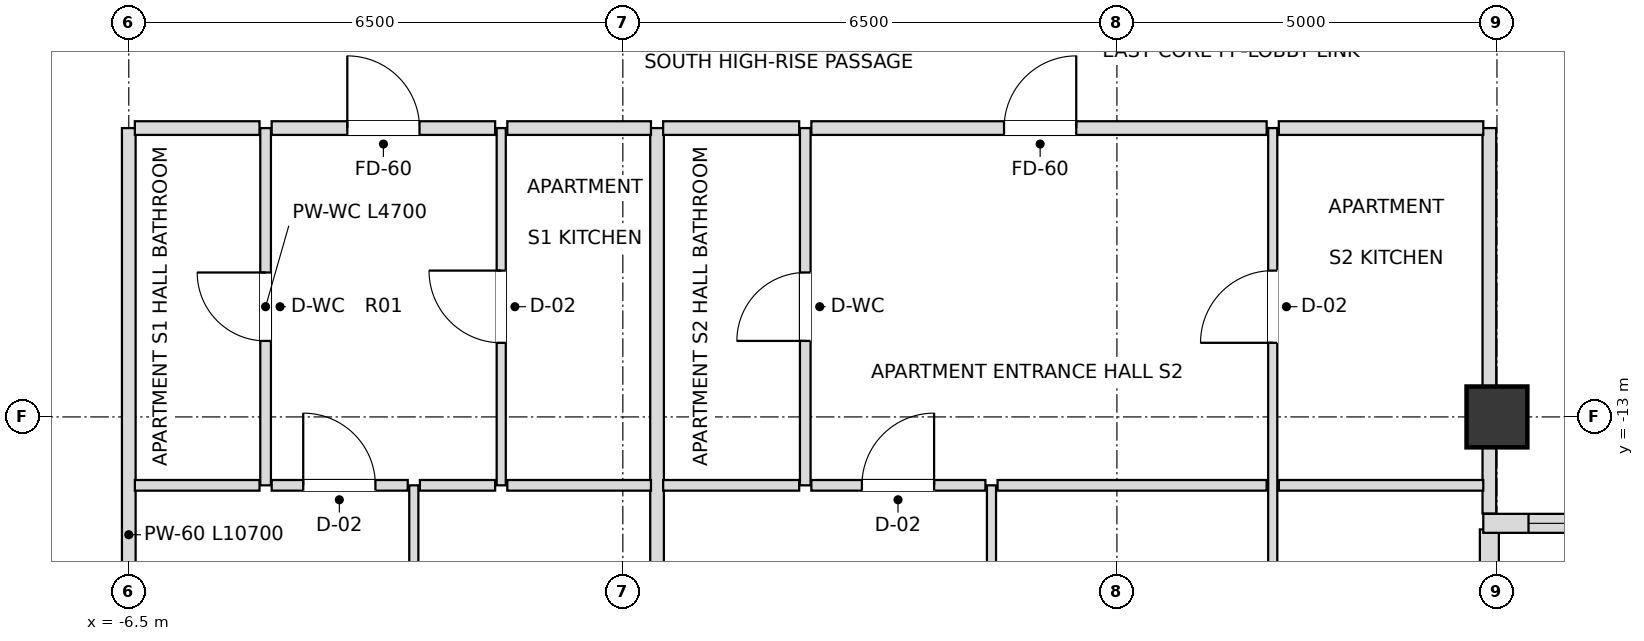
"""IFC4 building model, lengths in metres.
Left out: names, types, materials, properties, quantities, classifications, styles, units other than length and angle.
Written with IfcOpenShell. Run it as: python <this file> out.ifc"""

import sys

from ifc_helpers import new_model, si_unit, direction, frame, frame_2d, origin, origin_2d, place, context, subcontext, project, spatial, rectangle, extrude, element, fill, save


model = new_model("IFC4")
c1 = context("Model", 3, precision=1e-05, world=origin(), true_north=direction((0.0, 1.0)))
c2 = subcontext(c1, "Body", "Model", "MODEL_VIEW")
j1 = project(units=[si_unit("LENGTHUNIT", "METRE"), si_unit("PLANEANGLEUNIT", "RADIAN")], contexts=[c1])
p1 = place(None, origin())
s1 = spatial("IfcSite", under=j1, at=p1, CompositionType="ELEMENT")
p2 = place(p1, origin())
s2 = spatial("IfcBuilding", under=s1, at=p2, CompositionType="ELEMENT")
p3 = place(p2, frame((0.0, 0.0, 225.9)))
s3 = spatial("IfcBuildingStorey", under=s2, at=p3, CompositionType="ELEMENT", Elevation=225.9)
p4 = place(p3, frame((11.5, -13.0, 0.0), z_axis=(0.0, 0.0, 1.0), x_axis=(1.0, 0.0, 0.0)))
e1 = element("IfcColumn", 1, at=p4, inside=s3, PredefinedType="COLUMN", context=c2, shape_type="SweptSolid", body=[
    extrude(rectangle(XDim=0.8, YDim=0.8, at=origin_2d()), origin(), (0.0, 0.0, 1.0), 3.6),
])
p5 = place(p3, frame((11.4, -19.82, 0.0), z_axis=(0.0, 0.0, 1.0), x_axis=(0.0, 1.0, 0.0)))
e2 = element("IfcWall", 2, at=p5, inside=s3, PredefinedType="SOLIDWALL", context=c2, shape_type="SweptSolid", body=[
    extrude(rectangle(XDim=5.34, YDim=0.25, at=frame_2d((2.67, 0.0))), origin(), (0.0, 0.0, 1.0), 2.748),
])
p6 = place(p5, frame((1.925, 0.0, 0.72)))
e3 = element("IfcOpeningElement", 3, at=p6, cuts=e2, PredefinedType="OPENING", context=c2, shape_type="SweptSolid", body=[
    extrude(rectangle(XDim=1.8, YDim=1.68, at=frame_2d((0.9, 0.84))), frame((0.0, 0.135, 0.0), z_axis=(0.0, -1.0, 0.0), x_axis=(1.0, 0.0, 0.0)), (0.0, 0.0, 1.0), 0.27),
])
p7 = place(p3, frame((11.32, -14.4, 0.0), z_axis=(0.0, 0.0, 1.0), x_axis=(1.0, 0.0, 0.0)))
e4 = element("IfcWall", 4, at=p7, inside=s3, PredefinedType="SOLIDWALL", context=c2, shape_type="SweptSolid", body=[
    extrude(rectangle(XDim=5.66, YDim=0.25, at=frame_2d((2.83, 0.0))), origin(), (0.0, 0.0, 1.0), 2.748),
])
p8 = place(p7, frame((0.595, 0.0, 0.72)))
e5 = element("IfcOpeningElement", 5, at=p8, cuts=e4, PredefinedType="OPENING", context=c2, shape_type="SweptSolid", body=[
    extrude(rectangle(XDim=1.8, YDim=1.68, at=frame_2d((0.9, 0.84))), frame((0.0, 0.135, 0.0), z_axis=(0.0, -1.0, 0.0), x_axis=(1.0, 0.0, 0.0)), (0.0, 0.0, 1.0), 0.27),
])
p9 = place(p7, frame((3.265, 0.0, 0.72)))
e6 = element("IfcOpeningElement", 6, at=p9, cuts=e4, PredefinedType="OPENING", context=c2, shape_type="SweptSolid", body=[
    extrude(rectangle(XDim=1.8, YDim=1.68, at=frame_2d((0.9, 0.84))), frame((0.0, 0.135, 0.0), z_axis=(0.0, -1.0, 0.0), x_axis=(1.0, 0.0, 0.0)), (0.0, 0.0, 1.0), 0.27),
])
p10 = place(p3, frame((-6.5, -19.9, 0.0), z_axis=(0.0, 0.0, 1.0), x_axis=(0.0, 1.0, 0.0)))
e7 = element("IfcWall", 7, at=p10, inside=s3, PredefinedType="PARTITIONING", context=c2, shape_type="SweptSolid", body=[
    extrude(rectangle(XDim=10.7, YDim=0.18, at=frame_2d((5.35, 0.0))), origin(), (0.0, 0.0, 1.0), 2.826),
])
p11 = place(p3, frame((-4.7, -13.9, 0.0), z_axis=(0.0, 0.0, 1.0), x_axis=(0.0, 1.0, 0.0)))
e8 = element("IfcWall", 8, at=p11, inside=s3, PredefinedType="PARTITIONING", context=c2, shape_type="SweptSolid", body=[
    extrude(rectangle(XDim=4.7, YDim=0.14, at=frame_2d((2.35, 0.0))), origin(), (0.0, 0.0, 1.0), 3.38),
])
p12 = place(p11, frame((1.9, 0.0, 0.0)))
e9 = element("IfcOpeningElement", 9, at=p12, cuts=e8, PredefinedType="OPENING", context=c2, shape_type="SweptSolid", body=[
    extrude(rectangle(XDim=0.9, YDim=2.1, at=frame_2d((0.45, 1.05))), frame((0.0, 0.08, 0.0), z_axis=(0.0, -1.0, 0.0), x_axis=(1.0, 0.0, 0.0)), (0.0, 0.0, 1.0), 0.16),
])
p13 = place(p3, frame((-2.75, -19.9, 0.0), z_axis=(0.0, 0.0, 1.0), x_axis=(0.0, 1.0, 0.0)))
e10 = element("IfcWall", 10, at=p13, inside=s3, PredefinedType="PARTITIONING", context=c2, shape_type="SweptSolid", body=[
    extrude(rectangle(XDim=6.0, YDim=0.12, at=frame_2d((3.0, 0.0))), origin(), (0.0, 0.0, 1.0), 3.018),
])
p14 = place(p13, frame((2.55, 0.0, 0.0)))
e11 = element("IfcOpeningElement", 11, at=p14, cuts=e10, PredefinedType="OPENING", context=c2, shape_type="SweptSolid", body=[
    extrude(rectangle(XDim=0.9, YDim=2.1, at=frame_2d((0.45, 1.05))), frame((0.0, 0.07, 0.0), z_axis=(0.0, -1.0, 0.0), x_axis=(1.0, 0.0, 0.0)), (0.0, 0.0, 1.0), 0.14),
])
p15 = place(p3, frame((-1.6, -13.9, 0.0), z_axis=(0.0, 0.0, 1.0), x_axis=(0.0, 1.0, 0.0)))
e12 = element("IfcWall", 12, at=p15, inside=s3, PredefinedType="PARTITIONING", context=c2, shape_type="SweptSolid", body=[
    extrude(rectangle(XDim=4.7, YDim=0.12, at=frame_2d((2.35, 0.0))), origin(), (0.0, 0.0, 1.0), 3.38),
])
p16 = place(p15, frame((1.875, 0.0, 0.0)))
e13 = element("IfcOpeningElement", 13, at=p16, cuts=e12, PredefinedType="OPENING", context=c2, shape_type="SweptSolid", body=[
    extrude(rectangle(XDim=0.95, YDim=2.1, at=frame_2d((0.475, 1.05))), frame((0.0, 0.07, 0.0), z_axis=(0.0, -1.0, 0.0), x_axis=(1.0, 0.0, 0.0)), (0.0, 0.0, 1.0), 0.14),
])
p17 = place(p3, frame((0.45, -19.9, 0.0), z_axis=(0.0, 0.0, 1.0), x_axis=(0.0, 1.0, 0.0)))
e14 = element("IfcWall", 14, at=p17, inside=s3, PredefinedType="PARTITIONING", context=c2, shape_type="SweptSolid", body=[
    extrude(rectangle(XDim=10.7, YDim=0.18, at=frame_2d((5.35, 0.0))), origin(), (0.0, 0.0, 1.0), 3.018),
])
p18 = place(p3, frame((2.4, -13.9, 0.0), z_axis=(0.0, 0.0, 1.0), x_axis=(0.0, 1.0, 0.0)))
e15 = element("IfcWall", 15, at=p18, inside=s3, PredefinedType="PARTITIONING", context=c2, shape_type="SweptSolid", body=[
    extrude(rectangle(XDim=4.7, YDim=0.14, at=frame_2d((2.35, 0.0))), origin(), (0.0, 0.0, 1.0), 3.38),
])
p19 = place(p18, frame((1.9, 0.0, 0.0)))
e16 = element("IfcOpeningElement", 16, at=p19, cuts=e15, PredefinedType="OPENING", context=c2, shape_type="SweptSolid", body=[
    extrude(rectangle(XDim=0.9, YDim=2.1, at=frame_2d((0.45, 1.05))), frame((0.0, 0.08, 0.0), z_axis=(0.0, -1.0, 0.0), x_axis=(1.0, 0.0, 0.0)), (0.0, 0.0, 1.0), 0.16),
])
p20 = place(p3, frame((4.85, -19.9, 0.0), z_axis=(0.0, 0.0, 1.0), x_axis=(0.0, 1.0, 0.0)))
e17 = element("IfcWall", 17, at=p20, inside=s3, PredefinedType="PARTITIONING", context=c2, shape_type="SweptSolid", body=[
    extrude(rectangle(XDim=6.0, YDim=0.12, at=frame_2d((3.0, 0.0))), origin(), (0.0, 0.0, 1.0), 3.018),
])
p21 = place(p20, frame((2.55, 0.0, 0.0)))
e18 = element("IfcOpeningElement", 18, at=p21, cuts=e17, PredefinedType="OPENING", context=c2, shape_type="SweptSolid", body=[
    extrude(rectangle(XDim=0.9, YDim=2.1, at=frame_2d((0.45, 1.05))), frame((0.0, 0.07, 0.0), z_axis=(0.0, -1.0, 0.0), x_axis=(1.0, 0.0, 0.0)), (0.0, 0.0, 1.0), 0.14),
])
p22 = place(p3, frame((8.55, -19.9, 0.0), z_axis=(0.0, 0.0, 1.0), x_axis=(0.0, 1.0, 0.0)))
e19 = element("IfcWall", 19, at=p22, inside=s3, PredefinedType="PARTITIONING", context=c2, shape_type="SweptSolid", body=[
    extrude(rectangle(XDim=10.7, YDim=0.12, at=frame_2d((5.35, 0.0))), origin(), (0.0, 0.0, 1.0), 2.826),
])
p23 = place(p22, frame((7.875, 0.0, 0.0)))
e20 = element("IfcOpeningElement", 20, at=p23, cuts=e19, PredefinedType="OPENING", context=c2, shape_type="SweptSolid", body=[
    extrude(rectangle(XDim=0.95, YDim=2.1, at=frame_2d((0.475, 1.05))), frame((0.0, 0.07, 0.0), z_axis=(0.0, -1.0, 0.0), x_axis=(1.0, 0.0, 0.0)), (0.0, 0.0, 1.0), 0.14),
])
p24 = place(p22, frame((2.55, 0.0, 0.0)))
e21 = element("IfcOpeningElement", 21, at=p24, cuts=e19, PredefinedType="OPENING", context=c2, shape_type="SweptSolid", body=[
    extrude(rectangle(XDim=0.9, YDim=2.1, at=frame_2d((0.45, 1.05))), frame((0.0, 0.07, 0.0), z_axis=(0.0, -1.0, 0.0), x_axis=(1.0, 0.0, 0.0)), (0.0, 0.0, 1.0), 0.14),
])
p25 = place(p3, frame((11.4, -14.27, 0.0), z_axis=(0.0, 0.0, 1.0), x_axis=(0.0, 1.0, 0.0)))
e22 = element("IfcWall", 22, at=p25, inside=s3, PredefinedType="PARTITIONING", context=c2, shape_type="SweptSolid", body=[
    extrude(rectangle(XDim=5.07, YDim=0.18, at=frame_2d((2.535, 0.0))), origin(), (0.0, 0.0, 1.0), 2.748),
])
p26 = place(p3, frame((-6.42, -13.9, 0.0), z_axis=(0.0, 0.0, 1.0), x_axis=(1.0, 0.0, 0.0)))
e23 = element("IfcWall", 23, at=p26, inside=s3, PredefinedType="PARTITIONING", context=c2, shape_type="SweptSolid", body=[
    extrude(rectangle(XDim=1.64, YDim=0.14, at=frame_2d((0.82, 0.0))), origin(), (0.0, 0.0, 1.0), 3.38),
])
p27 = place(p3, frame((-4.62, -13.9, 0.0), z_axis=(0.0, 0.0, 1.0), x_axis=(1.0, 0.0, 0.0)))
e24 = element("IfcWall", 24, at=p27, inside=s3, PredefinedType="PARTITIONING", context=c2, shape_type="SweptSolid", body=[
    extrude(rectangle(XDim=1.79, YDim=0.14, at=frame_2d((0.895, 0.0))), origin(), (0.0, 0.0, 1.0), 3.38),
])
p28 = place(p27, frame((0.415, 0.0, 0.0)))
e25 = element("IfcOpeningElement", 25, at=p28, cuts=e24, PredefinedType="OPENING", context=c2, shape_type="SweptSolid", body=[
    extrude(rectangle(XDim=0.95, YDim=2.1, at=frame_2d((0.475, 1.05))), frame((0.0, 0.08, 0.0), z_axis=(0.0, -1.0, 0.0), x_axis=(1.0, 0.0, 0.0)), (0.0, 0.0, 1.0), 0.16),
])
p29 = place(p3, frame((-2.67, -13.9, 0.0), z_axis=(0.0, 0.0, 1.0), x_axis=(1.0, 0.0, 0.0)))
e26 = element("IfcWall", 26, at=p29, inside=s3, PredefinedType="PARTITIONING", context=c2, shape_type="SweptSolid", body=[
    extrude(rectangle(XDim=0.99, YDim=0.14, at=frame_2d((0.495, 0.0))), origin(), (0.0, 0.0, 1.0), 3.38),
])
p30 = place(p3, frame((-1.52, -13.9, 0.0), z_axis=(0.0, 0.0, 1.0), x_axis=(1.0, 0.0, 0.0)))
e27 = element("IfcWall", 27, at=p30, inside=s3, PredefinedType="PARTITIONING", context=c2, shape_type="SweptSolid", body=[
    extrude(rectangle(XDim=1.89, YDim=0.14, at=frame_2d((0.945, 0.0))), origin(), (0.0, 0.0, 1.0), 3.38),
])
p31 = place(p3, frame((0.53, -13.9, 0.0), z_axis=(0.0, 0.0, 1.0), x_axis=(1.0, 0.0, 0.0)))
e28 = element("IfcWall", 28, at=p31, inside=s3, PredefinedType="PARTITIONING", context=c2, shape_type="SweptSolid", body=[
    extrude(rectangle(XDim=1.79, YDim=0.14, at=frame_2d((0.895, 0.0))), origin(), (0.0, 0.0, 1.0), 3.38),
])
p32 = place(p3, frame((2.48, -13.9, 0.0), z_axis=(0.0, 0.0, 1.0), x_axis=(1.0, 0.0, 0.0)))
e29 = element("IfcWall", 29, at=p32, inside=s3, PredefinedType="PARTITIONING", context=c2, shape_type="SweptSolid", body=[
    extrude(rectangle(XDim=2.29, YDim=0.14, at=frame_2d((1.145, 0.0))), origin(), (0.0, 0.0, 1.0), 3.38),
])
p33 = place(p32, frame((0.665, 0.0, 0.0)))
e30 = element("IfcOpeningElement", 30, at=p33, cuts=e29, PredefinedType="OPENING", context=c2, shape_type="SweptSolid", body=[
    extrude(rectangle(XDim=0.95, YDim=2.1, at=frame_2d((0.475, 1.05))), frame((0.0, 0.08, 0.0), z_axis=(0.0, -1.0, 0.0), x_axis=(1.0, 0.0, 0.0)), (0.0, 0.0, 1.0), 0.16),
])
p34 = place(p3, frame((4.93, -13.9, 0.0), z_axis=(0.0, 0.0, 1.0), x_axis=(1.0, 0.0, 0.0)))
e31 = element("IfcWall", 31, at=p34, inside=s3, PredefinedType="PARTITIONING", context=c2, shape_type="SweptSolid", body=[
    extrude(rectangle(XDim=3.54, YDim=0.14, at=frame_2d((1.77, 0.0))), origin(), (0.0, 0.0, 1.0), 2.826),
])
p35 = place(p3, frame((8.63, -13.9, 0.0), z_axis=(0.0, 0.0, 1.0), x_axis=(1.0, 0.0, 0.0)))
e32 = element("IfcWall", 32, at=p35, inside=s3, PredefinedType="PARTITIONING", context=c2, shape_type="SweptSolid", body=[
    extrude(rectangle(XDim=2.69, YDim=0.14, at=frame_2d((1.345, 0.0))), origin(), (0.0, 0.0, 1.0), 3.38),
])
p36 = place(p3, frame((-6.42, -9.2, 0.0), z_axis=(0.0, 0.0, 1.0), x_axis=(1.0, 0.0, 0.0)))
e33 = element("IfcWall", 33, at=p36, inside=s3, PredefinedType="PARTITIONING", context=c2, shape_type="SweptSolid", body=[
    extrude(rectangle(XDim=1.64, YDim=0.18, at=frame_2d((0.82, 0.0))), origin(), (0.0, 0.0, 1.0), 3.38),
])
p37 = place(p3, frame((-4.62, -9.2, 0.0), z_axis=(0.0, 0.0, 1.0), x_axis=(1.0, 0.0, 0.0)))
e34 = element("IfcWall", 34, at=p37, inside=s3, PredefinedType="PARTITIONING", context=c2, shape_type="SweptSolid", body=[
    extrude(rectangle(XDim=2.94, YDim=0.18, at=frame_2d((1.47, 0.0))), origin(), (0.0, 0.0, 1.0), 3.38),
])
p38 = place(p37, frame((0.995, 0.0, 0.0)))
e35 = element("IfcOpeningElement", 35, at=p38, cuts=e34, PredefinedType="OPENING", context=c2, shape_type="SweptSolid", body=[
    extrude(rectangle(XDim=0.95, YDim=2.15, at=frame_2d((0.475, 1.075))), frame((0.0, 0.1, 0.0), z_axis=(0.0, -1.0, 0.0), x_axis=(1.0, 0.0, 0.0)), (0.0, 0.0, 1.0), 0.2),
])
p39 = place(p3, frame((-1.52, -9.2, 0.0), z_axis=(0.0, 0.0, 1.0), x_axis=(1.0, 0.0, 0.0)))
e36 = element("IfcWall", 36, at=p39, inside=s3, PredefinedType="PARTITIONING", context=c2, shape_type="SweptSolid", body=[
    extrude(rectangle(XDim=1.89, YDim=0.18, at=frame_2d((0.945, 0.0))), origin(), (0.0, 0.0, 1.0), 3.38),
])
p40 = place(p3, frame((0.53, -9.2, 0.0), z_axis=(0.0, 0.0, 1.0), x_axis=(1.0, 0.0, 0.0)))
e37 = element("IfcWall", 37, at=p40, inside=s3, PredefinedType="PARTITIONING", context=c2, shape_type="SweptSolid", body=[
    extrude(rectangle(XDim=1.79, YDim=0.18, at=frame_2d((0.895, 0.0))), origin(), (0.0, 0.0, 1.0), 3.38),
])
p41 = place(p3, frame((2.48, -9.2, 0.0), z_axis=(0.0, 0.0, 1.0), x_axis=(1.0, 0.0, 0.0)))
e38 = element("IfcWall", 38, at=p41, inside=s3, PredefinedType="PARTITIONING", context=c2, shape_type="SweptSolid", body=[
    extrude(rectangle(XDim=5.99, YDim=0.18, at=frame_2d((2.995, 0.0))), origin(), (0.0, 0.0, 1.0), 2.826),
])
p42 = place(p41, frame((2.535, 0.0, 0.0)))
e39 = element("IfcOpeningElement", 39, at=p42, cuts=e38, PredefinedType="OPENING", context=c2, shape_type="SweptSolid", body=[
    extrude(rectangle(XDim=0.95, YDim=2.15, at=frame_2d((0.475, 1.075))), frame((0.0, 0.1, 0.0), z_axis=(0.0, -1.0, 0.0), x_axis=(1.0, 0.0, 0.0)), (0.0, 0.0, 1.0), 0.2),
])
p43 = place(p3, frame((8.63, -9.2, 0.0), z_axis=(0.0, 0.0, 1.0), x_axis=(1.0, 0.0, 0.0)))
e40 = element("IfcWall", 40, at=p43, inside=s3, PredefinedType="PARTITIONING", context=c2, shape_type="SweptSolid", body=[
    extrude(rectangle(XDim=2.69, YDim=0.18, at=frame_2d((1.345, 0.0))), origin(), (0.0, 0.0, 1.0), 3.38),
])
p44 = place(p8, origin())
e41 = element("IfcWindow", 41, at=p44, inside=s3, PartitioningType="SINGLE_PANEL", PredefinedType="WINDOW", context=c2, shape_type="SweptSolid", body=[
    extrude(rectangle(XDim=1.8, YDim=1.68, at=frame_2d((0.9, 0.84))), frame((0.0, 0.03, 0.0), z_axis=(0.0, -1.0, 0.0), x_axis=(1.0, 0.0, 0.0)), (0.0, 0.0, 1.0), 0.06),
])
fill(e5, e41)
p45 = place(p12, origin())
e42 = element("IfcDoor", 42, at=p45, inside=s3, OperationType="SINGLE_SWING_RIGHT", PredefinedType="DOOR", context=c2, shape_type="SweptSolid", body=[
    extrude(rectangle(XDim=0.9, YDim=2.1, at=frame_2d((0.45, 1.05))), frame((0.0, 0.025, 0.0), z_axis=(0.0, -1.0, 0.0), x_axis=(1.0, 0.0, 0.0)), (0.0, 0.0, 1.0), 0.05),
])
fill(e9, e42)
p46 = place(p38, origin())
e43 = element("IfcDoor", 43, at=p46, inside=s3, OperationType="SINGLE_SWING_LEFT", PredefinedType="DOOR", context=c2, shape_type="SweptSolid", body=[
    extrude(rectangle(XDim=0.95, YDim=2.15, at=frame_2d((0.475, 1.075))), frame((0.0, 0.025, 0.0), z_axis=(0.0, -1.0, 0.0), x_axis=(1.0, 0.0, 0.0)), (0.0, 0.0, 1.0), 0.05),
])
fill(e35, e43)
p47 = place(p16, origin())
e44 = element("IfcDoor", 44, at=p47, inside=s3, OperationType="SINGLE_SWING_RIGHT", PredefinedType="DOOR", context=c2, shape_type="SweptSolid", body=[
    extrude(rectangle(XDim=0.95, YDim=2.1, at=frame_2d((0.475, 1.05))), frame((0.0, 0.025, 0.0), z_axis=(0.0, -1.0, 0.0), x_axis=(1.0, 0.0, 0.0)), (0.0, 0.0, 1.0), 0.05),
])
fill(e13, e44)
p48 = place(p28, origin())
e45 = element("IfcDoor", 45, at=p48, inside=s3, OperationType="SINGLE_SWING_LEFT", PredefinedType="DOOR", context=c2, shape_type="SweptSolid", body=[
    extrude(rectangle(XDim=0.95, YDim=2.1, at=frame_2d((0.475, 1.05))), frame((0.0, 0.025, 0.0), z_axis=(0.0, -1.0, 0.0), x_axis=(1.0, 0.0, 0.0)), (0.0, 0.0, 1.0), 0.05),
])
fill(e25, e45)
p49 = place(p19, origin())
e46 = element("IfcDoor", 46, at=p49, inside=s3, OperationType="SINGLE_SWING_LEFT", PredefinedType="DOOR", context=c2, shape_type="SweptSolid", body=[
    extrude(rectangle(XDim=0.9, YDim=2.1, at=frame_2d((0.45, 1.05))), frame((0.0, 0.025, 0.0), z_axis=(0.0, -1.0, 0.0), x_axis=(1.0, 0.0, 0.0)), (0.0, 0.0, 1.0), 0.05),
])
fill(e16, e46)
p50 = place(p42, origin())
e47 = element("IfcDoor", 47, at=p50, inside=s3, OperationType="SINGLE_SWING_RIGHT", PredefinedType="DOOR", context=c2, shape_type="SweptSolid", body=[
    extrude(rectangle(XDim=0.95, YDim=2.15, at=frame_2d((0.475, 1.075))), frame((0.0, 0.025, 0.0), z_axis=(0.0, -1.0, 0.0), x_axis=(1.0, 0.0, 0.0)), (0.0, 0.0, 1.0), 0.05),
])
fill(e39, e47)
p51 = place(p23, origin())
e48 = element("IfcDoor", 48, at=p51, inside=s3, OperationType="SINGLE_SWING_LEFT", PredefinedType="DOOR", context=c2, shape_type="SweptSolid", body=[
    extrude(rectangle(XDim=0.95, YDim=2.1, at=frame_2d((0.475, 1.05))), frame((0.0, 0.025, 0.0), z_axis=(0.0, -1.0, 0.0), x_axis=(1.0, 0.0, 0.0)), (0.0, 0.0, 1.0), 0.05),
])
fill(e20, e48)
p52 = place(p33, origin())
e49 = element("IfcDoor", 49, at=p52, inside=s3, OperationType="SINGLE_SWING_RIGHT", PredefinedType="DOOR", context=c2, shape_type="SweptSolid", body=[
    extrude(rectangle(XDim=0.95, YDim=2.1, at=frame_2d((0.475, 1.05))), frame((0.0, 0.025, 0.0), z_axis=(0.0, -1.0, 0.0), x_axis=(1.0, 0.0, 0.0)), (0.0, 0.0, 1.0), 0.05),
])
fill(e30, e49)
save(model, sys.argv[1])
